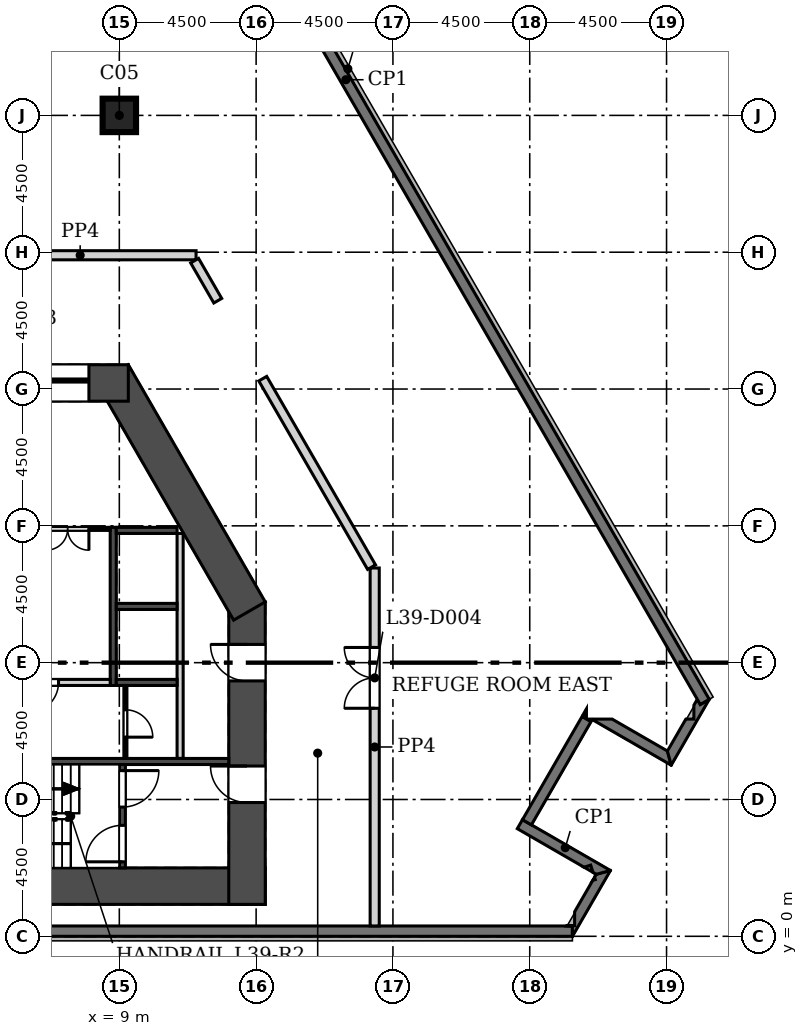
"""IFC4 building model, lengths in metres.
Left out: names, types, materials, properties, quantities, classifications, styles, units other than length and angle.
Written with IfcOpenShell. Run it as: python <this file> out.ifc"""

import sys

from ifc_helpers import new_model, si_unit, direction, frame, frame_2d, origin, origin_2d, place, context, subcontext, project, spatial, polyline, rectangle, outline, extrude, element, fill, save


model = new_model("IFC4")
c1 = context("Model", 3, precision=1e-05, world=origin(), true_north=direction((0.0, 1.0)))
c2 = subcontext(c1, "Body", "Model", "MODEL_VIEW")
j1 = project(units=[si_unit("LENGTHUNIT", "METRE"), si_unit("PLANEANGLEUNIT", "RADIAN")], contexts=[c1])
p1 = place(None, origin())
s1 = spatial("IfcSite", under=j1, at=p1, CompositionType="ELEMENT")
p2 = place(p1, origin())
s2 = spatial("IfcBuilding", under=s1, at=p2, CompositionType="ELEMENT")
p3 = place(p2, frame((0.0, 0.0, 174.9)))
s3 = spatial("IfcBuildingStorey", under=s2, at=p3, CompositionType="ELEMENT", Elevation=174.9)
p4 = place(p3, frame((9.0, 27.0, 0.0), z_axis=(0.0, 0.0, 1.0), x_axis=(1.0, 0.0, 0.0)))
e1 = element("IfcColumn", 1, at=p4, inside=s3, PredefinedType="COLUMN", context=c2, shape_type="SweptSolid", body=[
    extrude(rectangle(XDim=1.1, YDim=1.1, at=origin_2d()), origin(), (0.0, 0.0, 1.0), 7.2),
])
p5 = place(p3, frame((-13.8, 1.65, 0.0), z_axis=(0.0, 0.0, 1.0), x_axis=(1.0, 0.0, 0.0)))
e2 = element("IfcWall", 2, at=p5, inside=s3, PredefinedType="SHEAR", context=c2, shape_type="SweptSolid", body=[
    extrude(rectangle(XDim=27.6, YDim=1.2, at=frame_2d((13.8, 0.0))), origin(), (0.0, 0.0, 1.0), 7.2),
])
p6 = place(p3, frame((13.2, 1.05, 0.0), z_axis=(0.0, 0.0, 1.0), x_axis=(0.0, 1.0, 0.0)))
e3 = element("IfcWall", 3, at=p6, inside=s3, PredefinedType="SHEAR", context=c2, shape_type="SweptSolid", body=[
    extrude(rectangle(XDim=9.949, YDim=1.2, at=frame_2d((4.975, 0.0))), origin(), (0.0, 0.0, 1.0), 7.2),
])
p7 = place(p6, frame((3.35, 0.0, 0.0)))
e4 = element("IfcOpeningElement", 4, at=p7, cuts=e3, PredefinedType="OPENING", context=c2, shape_type="SweptSolid", body=[
    extrude(rectangle(XDim=1.2, YDim=2.1, at=frame_2d((0.6, 1.05))), frame((0.0, 0.61, 0.0), z_axis=(0.0, -1.0, 0.0), x_axis=(1.0, 0.0, 0.0)), (0.0, 0.0, 1.0), 1.22),
])
p8 = place(p6, frame((7.35, 0.0, 0.0)))
e5 = element("IfcOpeningElement", 5, at=p8, cuts=e3, PredefinedType="OPENING", context=c2, shape_type="SweptSolid", body=[
    extrude(rectangle(XDim=1.2, YDim=2.1, at=frame_2d((0.6, 1.05))), frame((0.0, 0.61, 0.0), z_axis=(0.0, -1.0, 0.0), x_axis=(1.0, 0.0, 0.0)), (0.0, 0.0, 1.0), 1.22),
])
p9 = place(p3, frame((13.281, 10.699, 0.0), z_axis=(0.0, 0.0, 1.0), x_axis=(-0.499998513025, 0.866026262288, 0.0)))
e6 = element("IfcWall", 6, at=p9, inside=s3, PredefinedType="SHEAR", context=c2, shape_type="SweptSolid", body=[
    extrude(rectangle(XDim=9.008, YDim=1.2, at=frame_2d((4.504, 0.0))), origin(), (0.0, 0.0, 1.0), 7.2),
])
p10 = place(p3, frame((9.296, 18.2, 0.0), z_axis=(0.0, 0.0, 1.0), x_axis=(-1.0, 0.0, 0.0)))
e7 = element("IfcWall", 7, at=p10, inside=s3, PredefinedType="SHEAR", context=c2, shape_type="SweptSolid", body=[
    extrude(rectangle(XDim=18.592, YDim=1.2, at=frame_2d((9.296, 0.0))), origin(), (0.0, 0.0, 1.0), 7.2),
])
p11 = place(p10, frame((8.596, 0.0, 0.0)))
e8 = element("IfcOpeningElement", 8, at=p11, cuts=e7, PredefinedType="OPENING", context=c2, shape_type="SweptSolid", body=[
    extrude(rectangle(XDim=1.4, YDim=2.1, at=frame_2d((0.7, 1.05))), frame((0.0, 0.61, 0.0), z_axis=(0.0, -1.0, 0.0), x_axis=(1.0, 0.0, 0.0)), (0.0, 0.0, 1.0), 1.22),
])
p12 = place(p10, frame((11.296, 0.0, 0.0)))
e9 = element("IfcOpeningElement", 9, at=p12, cuts=e7, PredefinedType="OPENING", context=c2, shape_type="SweptSolid", body=[
    extrude(rectangle(XDim=6.0, YDim=2.4, at=frame_2d((3.0, 1.2))), frame((0.0, 0.61, 0.0), z_axis=(0.0, -1.0, 0.0), x_axis=(1.0, 0.0, 0.0)), (0.0, 0.0, 1.0), 1.22),
])
p13 = place(p10, frame((1.296, 0.0, 0.0)))
e10 = element("IfcOpeningElement", 10, at=p13, cuts=e7, PredefinedType="OPENING", context=c2, shape_type="SweptSolid", body=[
    extrude(rectangle(XDim=6.0, YDim=2.4, at=frame_2d((3.0, 1.2))), frame((0.0, 0.61, 0.0), z_axis=(0.0, -1.0, 0.0), x_axis=(1.0, 0.0, 0.0)), (0.0, 0.0, 1.0), 1.22),
])
p14 = place(p3, frame((-23.904, 0.17, 0.0), z_axis=(0.0, 0.0, 1.0), x_axis=(1.0, 0.0, 0.0)))
e11 = element("IfcWall", 11, at=p14, inside=s3, PredefinedType="SOLIDWALL", context=c2, shape_type="SweptSolid", body=[
    extrude(rectangle(XDim=47.808, YDim=0.34, at=frame_2d((23.904, 0.0))), origin(), (0.0, 0.0, 1.0), 6.8),
])
p15 = place(p3, origin())
e12 = element("IfcWall", 12, at=p15, inside=s3, PredefinedType="SOLIDWALL", context=c2, shape_type="SweptSolid", body=[
    extrude(outline(polyline([(24.632, 1.942), (24.656, 1.865), (24.572, 1.839), (24.632, 1.942)])), origin(), (0.0, 0.0, 1.0), 6.0),
])
p16 = place(p3, origin())
e13 = element("IfcWall", 13, at=p16, inside=s3, PredefinedType="SOLIDWALL", context=c2, shape_type="SweptSolid", body=[
    extrude(outline(polyline([(23.904, -0.001), (23.903, -0.001), (23.903, 0.339), (23.706, 0.339), (23.712, 0.35), (23.976, 0.35), (23.976, 0.807), (24.572, 1.839), (24.656, 1.865), (24.632, 1.942), (24.689, 2.041), (25.155, 2.166), (25.155, 2.166), (23.904, -0.001)])), origin(), (0.0, 0.0, 1.0), 6.8),
])
p17 = place(p3, origin())
e14 = element("IfcWall", 14, at=p17, inside=s3, PredefinedType="SOLIDWALL", context=c2, shape_type="SweptSolid", body=[
    extrude(outline(polyline([(24.286, 2.273), (24.505, 2.342), (24.581, 2.103), (24.286, 2.273)])), origin(), (0.0, 0.0, 1.0), 6.0),
])
p18 = place(p3, origin())
e15 = element("IfcWall", 15, at=p18, inside=s3, PredefinedType="SOLIDWALL", context=c2, shape_type="SweptSolid", body=[
    extrude(outline(polyline([(22.261, 3.836), (22.556, 3.666), (25.155, 2.165), (25.155, 2.165), (24.689, 2.04), (24.581, 2.103), (24.505, 2.342), (24.286, 2.273), (22.09, 3.54), (22.261, 3.836)])), origin(), (0.0, 0.0, 1.0), 6.8),
])
p19 = place(p3, frame((22.408, 3.75, 0.0), z_axis=(0.0, 0.0, 1.0), x_axis=(0.499979589489, 0.866037187478, 0.0)))
e16 = element("IfcWall", 16, at=p19, inside=s3, PredefinedType="SOLIDWALL", context=c2, shape_type="SweptSolid", body=[
    extrude(rectangle(XDim=3.918, YDim=0.34, at=frame_2d((1.959, 0.0))), origin(), (0.0, 0.0, 1.0), 6.8),
])
p20 = place(p3, origin())
e17 = element("IfcWall", 17, at=p20, inside=s3, PredefinedType="SOLIDWALL", context=c2, shape_type="SweptSolid", body=[
    extrude(outline(polyline([(27.154, 5.628), (24.555, 7.129), (24.528, 7.144), (25.211, 7.144), (27.03, 6.094), (27.155, 5.628), (27.154, 5.628)])), origin(), (0.0, 0.0, 1.0), 6.8),
])
p21 = place(p3, origin())
e18 = element("IfcWall", 18, at=p21, inside=s3, PredefinedType="SOLIDWALL", context=c2, shape_type="SweptSolid", body=[
    extrude(outline(polyline([(24.26, 7.299), (24.365, 7.48), (24.365, 7.239), (24.26, 7.299)])), origin(), (0.0, 0.0, 1.0), 6.8),
])
p22 = place(p3, origin())
e19 = element("IfcWall", 19, at=p22, inside=s3, PredefinedType="SOLIDWALL", context=c2, shape_type="SweptSolid", body=[
    extrude(outline(polyline([(27.635, 7.144), (27.899, 7.144), (27.899, 7.601), (28.011, 7.795), (28.109, 7.625), (28.404, 7.795), (28.405, 7.795), (27.154, 5.628), (27.153, 5.628), (27.029, 6.094), (27.635, 7.144)])), origin(), (0.0, 0.0, 1.0), 6.8),
])
p23 = place(p3, frame((28.257, 7.709, 0.0), z_axis=(0.0, 0.0, 1.0), x_axis=(-0.500002420408, 0.866024006357, 0.0)))
e20 = element("IfcWall", 20, at=p23, inside=s3, PredefinedType="SOLIDWALL", context=c2, shape_type="SweptSolid", body=[
    extrude(rectangle(XDim=47.807, YDim=0.34, at=frame_2d((23.904, 0.0))), origin(), (0.0, 0.0, 1.0), 6.8),
])
p24 = place(p23, frame((32.452, 0.0, 0.9)))
e21 = element("IfcOpeningElement", 21, at=p24, cuts=e20, PredefinedType="OPENING", context=c2, shape_type="SweptSolid", body=[
    extrude(rectangle(XDim=1.885, YDim=3.0, at=frame_2d((0.942, 1.5))), frame((0.0, 0.18, 0.0), z_axis=(0.0, -1.0, 0.0), x_axis=(1.0, 0.0, 0.0)), (0.0, 0.0, 1.0), 0.36),
])
p25 = place(p23, frame((38.452, 0.0, 0.9)))
e22 = element("IfcOpeningElement", 22, at=p25, cuts=e20, PredefinedType="OPENING", context=c2, shape_type="SweptSolid", body=[
    extrude(rectangle(XDim=1.885, YDim=3.0, at=frame_2d((0.942, 1.5))), frame((0.0, 0.18, 0.0), z_axis=(0.0, -1.0, 0.0), x_axis=(1.0, 0.0, 0.0)), (0.0, 0.0, 1.0), 0.36),
])
p26 = place(p23, frame((44.452, 0.0, 0.9)))
e23 = element("IfcOpeningElement", 23, at=p26, cuts=e20, PredefinedType="OPENING", context=c2, shape_type="SweptSolid", body=[
    extrude(rectangle(XDim=1.885, YDim=3.0, at=frame_2d((0.942, 1.5))), frame((0.0, 0.18, 0.0), z_axis=(0.0, -1.0, 0.0), x_axis=(1.0, 0.0, 0.0)), (0.0, 0.0, 1.0), 0.36),
])
p27 = place(p3, frame((11.0, 5.85, 0.0), z_axis=(0.0, 0.0, 1.0), x_axis=(0.0, 1.0, 0.0)))
e24 = element("IfcWall", 24, at=p27, inside=s3, PredefinedType="SOLIDWALL", context=c2, shape_type="SweptSolid", body=[
    extrude(rectangle(XDim=7.4, YDim=0.2, at=frame_2d((3.7, 0.0))), origin(), (0.0, 0.0, 1.0), 6.8),
])
p28 = place(p3, frame((8.8, 8.25, -0.4), z_axis=(0.0, 0.0, 1.0), x_axis=(0.0, 1.0, 0.0)))
e25 = element("IfcWall", 25, at=p28, inside=s3, PredefinedType="SOLIDWALL", context=c2, shape_type="SweptSolid", body=[
    extrude(rectangle(XDim=5.2, YDim=0.2, at=frame_2d((2.6, 0.0))), origin(), (0.0, 0.0, 1.0), 7.2),
])
p29 = place(p3, frame((8.9, 8.35, -0.4), z_axis=(0.0, 0.0, 1.0), x_axis=(1.0, 0.0, 0.0)))
e26 = element("IfcWall", 26, at=p29, inside=s3, PredefinedType="SOLIDWALL", context=c2, shape_type="SweptSolid", body=[
    extrude(rectangle(XDim=2.0, YDim=0.2, at=frame_2d((1.0, 0.0))), origin(), (0.0, 0.0, 1.0), 7.2),
])
p30 = place(p3, frame((1.2, 5.75, -0.4), z_axis=(0.0, 0.0, 1.0), x_axis=(1.0, 0.0, 0.0)))
e27 = element("IfcWall", 27, at=p30, inside=s3, PredefinedType="SOLIDWALL", context=c2, shape_type="SweptSolid", body=[
    extrude(rectangle(XDim=11.4, YDim=0.2, at=frame_2d((5.7, 0.0))), origin(), (0.0, 0.0, 1.0), 7.2),
])
p31 = place(p3, frame((9.1, 2.25, -0.4), z_axis=(0.0, 0.0, 1.0), x_axis=(0.0, 1.0, 0.0)))
e28 = element("IfcWall", 28, at=p31, inside=s3, PredefinedType="SOLIDWALL", context=c2, shape_type="SweptSolid", body=[
    extrude(rectangle(XDim=3.4, YDim=0.2, at=frame_2d((1.7, 0.0))), origin(), (0.0, 0.0, 1.0), 7.2),
])
p32 = place(p31, frame((0.2, 0.0, 0.4)))
e29 = element("IfcOpeningElement", 29, at=p32, cuts=e28, PredefinedType="OPENING", context=c2, shape_type="SweptSolid", body=[
    extrude(rectangle(XDim=1.2, YDim=2.1, at=frame_2d((0.6, 1.05))), frame((0.0, 0.11, 0.0), z_axis=(0.0, -1.0, 0.0), x_axis=(1.0, 0.0, 0.0)), (0.0, 0.0, 1.0), 0.22),
])
p33 = place(p31, frame((2.0, 0.0, 0.4)))
e30 = element("IfcOpeningElement", 30, at=p33, cuts=e28, PredefinedType="OPENING", context=c2, shape_type="SweptSolid", body=[
    extrude(rectangle(XDim=1.2, YDim=2.1, at=frame_2d((0.6, 1.05))), frame((0.0, 0.11, 0.0), z_axis=(0.0, -1.0, 0.0), x_axis=(1.0, 0.0, 0.0)), (0.0, 0.0, 1.0), 0.22),
])
for number, where, z_axis, x_axis in (
    (31, (8.9, 10.85, -0.4), (0.0, 0.0, 1.0), (1.0, 0.0, 0.0)),
    (32, (8.9, 13.35, -0.4), (0.0, 0.0, 1.0), (1.0, 0.0, 0.0)),
):
    element("IfcWall", number, at=place(p3, frame(where, z_axis=z_axis, x_axis=x_axis)), inside=s3, PredefinedType="SOLIDWALL", context=c2, shape_type="SweptSolid", body=[
        extrude(rectangle(XDim=2.0, YDim=0.2, at=frame_2d((1.0, 0.0))), origin(), (0.0, 0.0, 1.0), 7.2),
    ])
p34 = place(p3, frame((5.9, 13.4, 0.0), z_axis=(0.0, 0.0, 1.0), x_axis=(1.0, 0.0, 0.0)))
e33 = element("IfcWall", 33, at=p34, inside=s3, PredefinedType="PARTITIONING", context=c2, shape_type="SweptSolid", body=[
    extrude(rectangle(XDim=2.8, YDim=0.1, at=frame_2d((1.4, 0.0))), origin(), (0.0, 0.0, 1.0), 6.8),
])
p35 = place(p34, frame((0.7, 0.0, 0.0)))
e34 = element("IfcOpeningElement", 34, at=p35, cuts=e33, PredefinedType="OPENING", context=c2, shape_type="SweptSolid", body=[
    extrude(rectangle(XDim=1.4, YDim=2.1, at=frame_2d((0.7, 1.05))), frame((0.0, 0.06, 0.0), z_axis=(0.0, -1.0, 0.0), x_axis=(1.0, 0.0, 0.0)), (0.0, 0.0, 1.0), 0.12),
])
p36 = place(p3, frame((9.2, 5.85, 0.0), z_axis=(0.0, 0.0, 1.0), x_axis=(0.0, 1.0, 0.0)))
e35 = element("IfcWall", 35, at=p36, inside=s3, PredefinedType="PARTITIONING", context=c2, shape_type="SweptSolid", body=[
    extrude(rectangle(XDim=2.4, YDim=0.1, at=frame_2d((1.2, 0.0))), origin(), (0.0, 0.0, 1.0), 6.8),
])
p37 = place(p36, frame((0.7, 0.0, 0.0)))
e36 = element("IfcOpeningElement", 36, at=p37, cuts=e35, PredefinedType="OPENING", context=c2, shape_type="SweptSolid", body=[
    extrude(rectangle(XDim=0.9, YDim=2.1, at=frame_2d((0.45, 1.05))), frame((0.0, 0.06, 0.0), z_axis=(0.0, -1.0, 0.0), x_axis=(1.0, 0.0, 0.0)), (0.0, 0.0, 1.0), 0.12),
])
p38 = place(p3, frame((5.9, 8.35, 0.0), z_axis=(0.0, 0.0, 1.0), x_axis=(1.0, 0.0, 0.0)))
e37 = element("IfcWall", 37, at=p38, inside=s3, PredefinedType="SOLIDWALL", context=c2, shape_type="SweptSolid", body=[
    extrude(rectangle(XDim=2.8, YDim=0.2, at=frame_2d((1.4, 0.0))), origin(), (0.0, 0.0, 1.0), 6.8),
])
p39 = place(p38, frame((0.1, 0.0, 0.0)))
e38 = element("IfcOpeningElement", 38, at=p39, cuts=e37, PredefinedType="OPENING", context=c2, shape_type="SweptSolid", body=[
    extrude(rectangle(XDim=1.0, YDim=2.1, at=frame_2d((0.5, 1.05))), frame((0.0, 0.11, 0.0), z_axis=(0.0, -1.0, 0.0), x_axis=(1.0, 0.0, 0.0)), (0.0, 0.0, 1.0), 0.22),
])
p40 = place(p3, frame((7.4, 3.95, 0.0), z_axis=(0.0, 0.0, 1.0), x_axis=(1.0, 0.0, 0.0)))
e39 = element("IfcWall", 39, at=p40, inside=s3, PredefinedType="SOLIDWALL", context=c2, shape_type="SweptSolid", body=[
    extrude(rectangle(XDim=1.6, YDim=0.2, at=frame_2d((0.8, 0.0))), origin(), (0.0, 0.0, 1.0), 6.8),
])
p41 = place(p3, frame((17.4, 12.114, 0.0), z_axis=(0.0, 0.0, 1.0), x_axis=(0.0, -1.0, 0.0)))
e40 = element("IfcWall", 40, at=p41, inside=s3, PredefinedType="SOLIDWALL", context=c2, shape_type="SweptSolid", body=[
    extrude(rectangle(XDim=11.773, YDim=0.3, at=frame_2d((5.887, 0.0))), origin(), (0.0, 0.0, 1.0), 6.8),
])
p42 = place(p41, frame((2.614, 0.0, 0.0)))
e41 = element("IfcOpeningElement", 41, at=p42, cuts=e40, PredefinedType="OPENING", context=c2, shape_type="SweptSolid", body=[
    extrude(rectangle(XDim=2.0, YDim=2.1, at=frame_2d((1.0, 1.05))), frame((0.0, 0.16, 0.0), z_axis=(0.0, -1.0, 0.0), x_axis=(1.0, 0.0, 0.0)), (0.0, 0.0, 1.0), 0.32),
])
p43 = place(p3, frame((3.9, 22.4, 0.0), z_axis=(0.0, 0.0, 1.0), x_axis=(1.0, 0.0, 0.0)))
e42 = element("IfcWall", 42, at=p43, inside=s3, PredefinedType="SOLIDWALL", context=c2, shape_type="SweptSolid", body=[
    extrude(rectangle(XDim=7.625, YDim=0.3, at=frame_2d((3.812, 0.0))), origin(), (0.0, 0.0, 1.0), 6.8),
])
p44 = place(p3, frame((13.718, 18.341, 0.0), z_axis=(0.0, 0.0, 1.0), x_axis=(0.500004857339, -0.86602259938, 0.0)))
e43 = element("IfcWall", 43, at=p44, inside=s3, PredefinedType="SOLIDWALL", context=c2, shape_type="SweptSolid", body=[
    extrude(rectangle(XDim=7.159, YDim=0.3, at=frame_2d((3.58, 0.0))), origin(), (0.0, 0.0, 1.0), 6.8),
])
p45 = place(p3, frame((11.477, 22.222, 0.0), z_axis=(0.0, 0.0, 1.0), x_axis=(0.500004885773, -0.866022582964, 0.0)))
e44 = element("IfcWall", 44, at=p45, inside=s3, PredefinedType="SOLIDWALL", context=c2, shape_type="SweptSolid", body=[
    extrude(rectangle(XDim=1.521, YDim=0.3, at=frame_2d((0.761, 0.0))), origin(), (0.0, 0.0, 1.0), 6.8),
])
p46 = place(p35, frame((1.4, 0.0, 0.0), z_axis=(0.0, 0.0, 1.0), x_axis=(-1.0, 0.0, 0.0)))
e45 = element("IfcDoor", 45, at=p46, inside=s3, OperationType="DOUBLE_DOOR_SINGLE_SWING", PredefinedType="DOOR", context=c2, shape_type="SweptSolid", body=[
    extrude(rectangle(XDim=1.4, YDim=2.1, at=frame_2d((0.7, 1.05))), frame((0.0, 0.025, 0.0), z_axis=(0.0, -1.0, 0.0), x_axis=(1.0, 0.0, 0.0)), (0.0, 0.0, 1.0), 0.05),
])
fill(e34, e45)
p47 = place(p39, frame((1.0, 0.0, 0.0), z_axis=(0.0, 0.0, 1.0), x_axis=(-1.0, 0.0, 0.0)))
e46 = element("IfcDoor", 46, at=p47, inside=s3, OperationType="SINGLE_SWING_RIGHT", PredefinedType="DOOR", context=c2, shape_type="SweptSolid", body=[
    extrude(rectangle(XDim=1.0, YDim=2.1, at=frame_2d((0.5, 1.05))), frame((0.0, 0.025, 0.0), z_axis=(0.0, -1.0, 0.0), x_axis=(1.0, 0.0, 0.0)), (0.0, 0.0, 1.0), 0.05),
])
fill(e38, e46)
p48 = place(p37, frame((0.9, 0.0, 0.0), z_axis=(0.0, 0.0, 1.0), x_axis=(-1.0, 0.0, 0.0)))
e47 = element("IfcDoor", 47, at=p48, inside=s3, OperationType="SINGLE_SWING_RIGHT", PredefinedType="DOOR", context=c2, shape_type="SweptSolid", body=[
    extrude(rectangle(XDim=0.9, YDim=2.1, at=frame_2d((0.45, 1.05))), frame((0.0, 0.025, 0.0), z_axis=(0.0, -1.0, 0.0), x_axis=(1.0, 0.0, 0.0)), (0.0, 0.0, 1.0), 0.05),
])
fill(e36, e47)
p49 = place(p7, origin())
e48 = element("IfcDoor", 48, at=p49, inside=s3, OperationType="SINGLE_SWING_RIGHT", PredefinedType="DOOR", context=c2, shape_type="SweptSolid", body=[
    extrude(rectangle(XDim=1.2, YDim=2.1, at=frame_2d((0.6, 1.05))), frame((0.0, 0.025, 0.0), z_axis=(0.0, -1.0, 0.0), x_axis=(1.0, 0.0, 0.0)), (0.0, 0.0, 1.0), 0.05),
])
fill(e4, e48)
p50 = place(p32, origin())
e49 = element("IfcDoor", 49, at=p50, inside=s3, OperationType="SINGLE_SWING_LEFT", PredefinedType="DOOR", context=c2, shape_type="SweptSolid", body=[
    extrude(rectangle(XDim=1.2, YDim=2.1, at=frame_2d((0.6, 1.05))), frame((0.0, 0.025, 0.0), z_axis=(0.0, -1.0, 0.0), x_axis=(1.0, 0.0, 0.0)), (0.0, 0.0, 1.0), 0.05),
])
fill(e29, e49)
p51 = place(p8, origin())
e50 = element("IfcDoor", 50, at=p51, inside=s3, OperationType="SINGLE_SWING_RIGHT", PredefinedType="DOOR", context=c2, shape_type="SweptSolid", body=[
    extrude(rectangle(XDim=1.2, YDim=2.1, at=frame_2d((0.6, 1.05))), frame((0.0, 0.025, 0.0), z_axis=(0.0, -1.0, 0.0), x_axis=(1.0, 0.0, 0.0)), (0.0, 0.0, 1.0), 0.05),
])
fill(e5, e50)
p52 = place(p13, origin())
e51 = element("IfcDoor", 51, at=p52, inside=s3, OperationType="DOUBLE_DOOR_SLIDING", PredefinedType="DOOR", context=c2, shape_type="SweptSolid", body=[
    extrude(rectangle(XDim=6.0, YDim=2.4, at=frame_2d((3.0, 1.2))), frame((0.0, 0.025, 0.0), z_axis=(0.0, -1.0, 0.0), x_axis=(1.0, 0.0, 0.0)), (0.0, 0.0, 1.0), 0.05),
])
fill(e10, e51)
p53 = place(p33, frame((1.2, 0.0, 0.0), z_axis=(0.0, 0.0, 1.0), x_axis=(-1.0, 0.0, 0.0)))
e52 = element("IfcDoor", 52, at=p53, inside=s3, OperationType="SINGLE_SWING_LEFT", PredefinedType="DOOR", context=c2, shape_type="SweptSolid", body=[
    extrude(rectangle(XDim=1.2, YDim=2.1, at=frame_2d((0.6, 1.05))), frame((0.0, 0.025, 0.0), z_axis=(0.0, -1.0, 0.0), x_axis=(1.0, 0.0, 0.0)), (0.0, 0.0, 1.0), 0.05),
])
fill(e30, e52)
p54 = place(p42, frame((2.0, 0.0, 0.0), z_axis=(0.0, 0.0, 1.0), x_axis=(-1.0, 0.0, 0.0)))
e53 = element("IfcDoor", 53, at=p54, inside=s3, OperationType="DOUBLE_DOOR_SINGLE_SWING", PredefinedType="DOOR", context=c2, shape_type="SweptSolid", body=[
    extrude(rectangle(XDim=2.0, YDim=2.1, at=frame_2d((1.0, 1.05))), frame((0.0, 0.025, 0.0), z_axis=(0.0, -1.0, 0.0), x_axis=(1.0, 0.0, 0.0)), (0.0, 0.0, 1.0), 0.05),
])
fill(e41, e53)
save(model, sys.argv[1])
